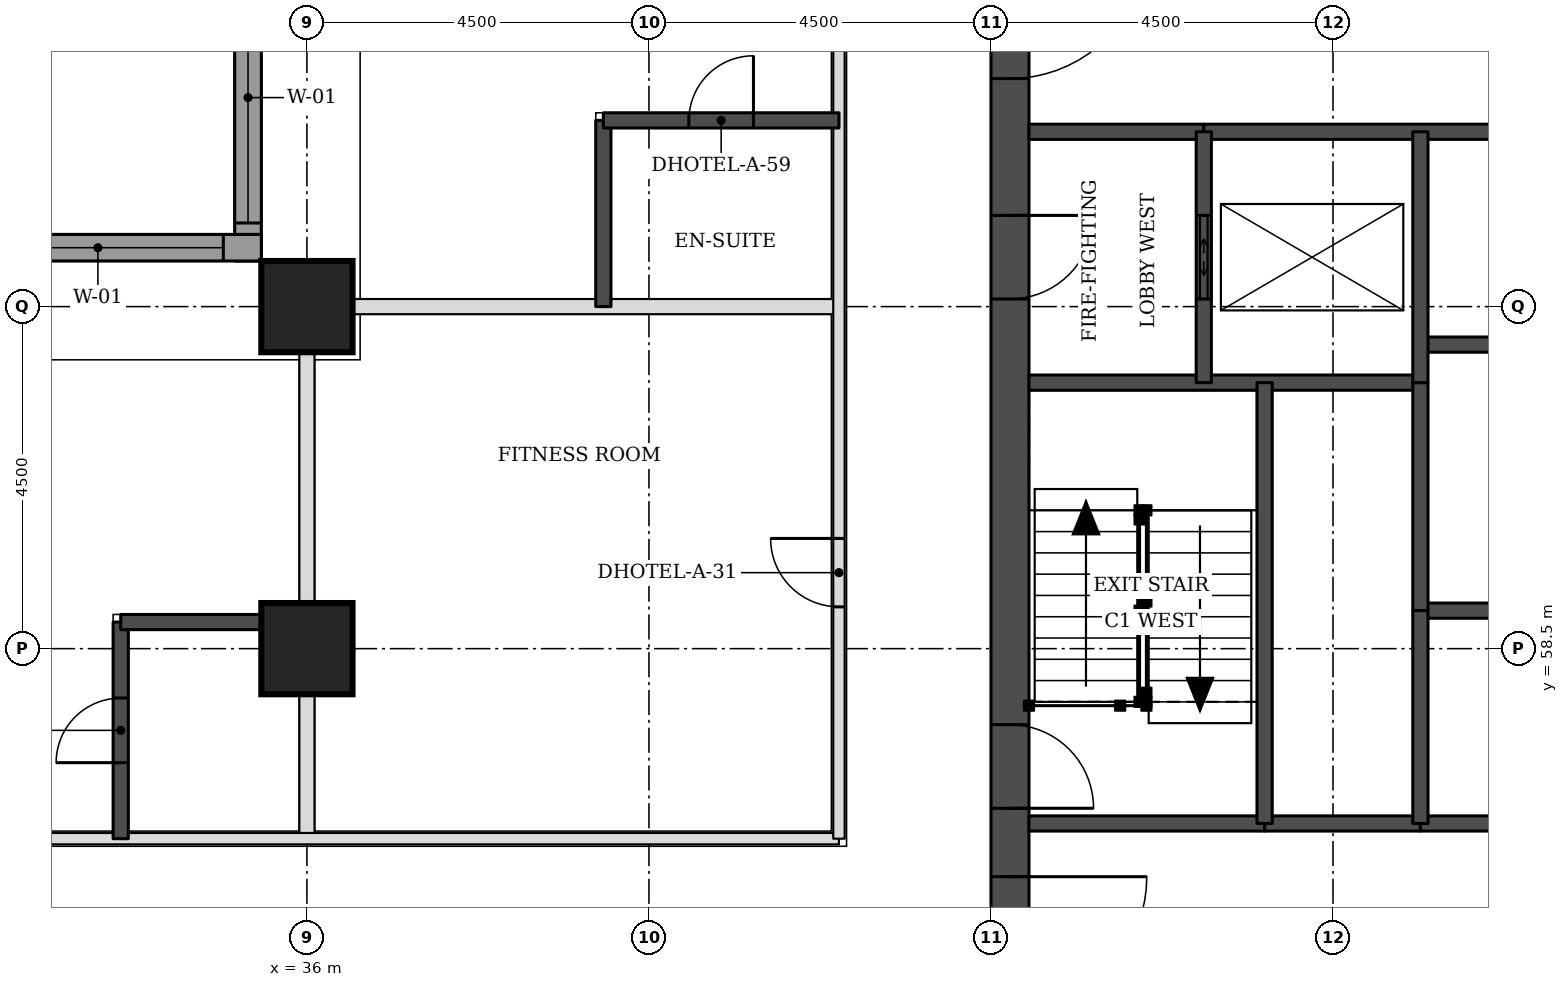
"""IFC4 building model, lengths in metres.
Left out: names, types, materials, properties, quantities, classifications, styles, units other than length and angle.
Written with IfcOpenShell. Run it as: python <this file> out.ifc"""

import sys

from ifc_helpers import new_model, si_unit, direction, frame, frame_2d, origin, origin_2d, place, context, subcontext, project, spatial, rectangle, extrude, element, fill, save


model = new_model("IFC4")
c1 = context("Model", 3, precision=1e-05, world=origin(), true_north=direction((0.0, 1.0)))
c2 = subcontext(c1, "Body", "Model", "MODEL_VIEW")
j1 = project(units=[si_unit("LENGTHUNIT", "METRE"), si_unit("PLANEANGLEUNIT", "RADIAN")], contexts=[c1])
p1 = place(None, origin())
s1 = spatial("IfcSite", under=j1, at=p1, CompositionType="ELEMENT")
p2 = place(p1, origin())
s2 = spatial("IfcBuilding", under=s1, at=p2, CompositionType="ELEMENT")
p3 = place(p2, frame((0.0, 0.0, 49.5)))
s3 = spatial("IfcBuildingStorey", under=s2, at=p3, CompositionType="ELEMENT", Elevation=49.5)
for number, where, z_axis, x_axis in (
    (1, (36.0, 58.5, 0.0), (0.0, 0.0, 1.0), (1.0, 0.0, 0.0)),
    (2, (36.0, 63.0, 0.0), (0.0, 0.0, 1.0), (1.0, 0.0, 0.0)),
):
    element("IfcColumn", number, at=place(p3, frame(where, z_axis=z_axis, x_axis=x_axis)), inside=s3, PredefinedType="COLUMN", context=c2, shape_type="SweptSolid", body=[
        extrude(rectangle(XDim=1.2, YDim=1.2, at=origin_2d()), origin(), (0.0, 0.0, 1.0), 3.3),
    ])
p4 = place(p3, frame((45.25, 49.5, 0.0), z_axis=(0.0, 0.0, 1.0), x_axis=(0.0, 1.0, 0.0)))
e3 = element("IfcWall", 3, at=p4, inside=s3, PredefinedType="SHEAR", context=c2, shape_type="SweptSolid", body=[
    extrude(rectangle(XDim=22.5, YDim=0.5, at=frame_2d((11.25, 0.0))), origin(), (0.0, 0.0, 1.0), 3.3),
])
p5 = place(p4, frame((4.2, 0.0, 0.0)))
e4 = element("IfcOpeningElement", 4, at=p5, cuts=e3, PredefinedType="OPENING", context=c2, shape_type="SweptSolid", body=[
    extrude(rectangle(XDim=1.8, YDim=2.1, at=frame_2d((0.9, 1.05))), frame((0.0, 0.26, 0.0), z_axis=(0.0, -1.0, 0.0), x_axis=(1.0, 0.0, 0.0)), (0.0, 0.0, 1.0), 0.52),
])
p6 = place(p4, frame((6.9, 0.0, 0.0)))
e5 = element("IfcOpeningElement", 5, at=p6, cuts=e3, PredefinedType="OPENING", context=c2, shape_type="SweptSolid", body=[
    extrude(rectangle(XDim=1.1, YDim=2.1, at=frame_2d((0.55, 1.05))), frame((0.0, 0.26, 0.0), z_axis=(0.0, -1.0, 0.0), x_axis=(1.0, 0.0, 0.0)), (0.0, 0.0, 1.0), 0.52),
])
p7 = place(p4, frame((13.6, 0.0, 0.0)))
e6 = element("IfcOpeningElement", 6, at=p7, cuts=e3, PredefinedType="OPENING", context=c2, shape_type="SweptSolid", body=[
    extrude(rectangle(XDim=1.1, YDim=2.1, at=frame_2d((0.55, 1.05))), frame((0.0, 0.26, 0.0), z_axis=(0.0, -1.0, 0.0), x_axis=(1.0, 0.0, 0.0)), (0.0, 0.0, 1.0), 0.52),
])
p8 = place(p4, frame((16.5, 0.0, 0.0)))
e7 = element("IfcOpeningElement", 7, at=p8, cuts=e3, PredefinedType="OPENING", context=c2, shape_type="SweptSolid", body=[
    extrude(rectangle(XDim=1.8, YDim=2.1, at=frame_2d((0.9, 1.05))), frame((0.0, 0.26, 0.0), z_axis=(0.0, -1.0, 0.0), x_axis=(1.0, 0.0, 0.0)), (0.0, 0.0, 1.0), 0.52),
])
p9 = place(p3, frame((35.225, 76.894, 0.0), z_axis=(0.0, 0.0, 1.0), x_axis=(0.0, -1.0, 0.0)))
e8 = element("IfcWall", 8, at=p9, inside=s3, PredefinedType="STANDARD", context=c2, shape_type="SweptSolid", body=[
    extrude(rectangle(XDim=13.293, YDim=0.35, at=frame_2d((6.647, 0.0))), origin(), (0.0, 0.0, 1.0), 3.055),
])
p10 = place(p9, frame((9.493, 0.0, 0.8)))
e9 = element("IfcOpeningElement", 9, at=p10, cuts=e8, PredefinedType="OPENING", context=c2, shape_type="SweptSolid", body=[
    extrude(rectangle(XDim=3.3, YDim=1.5, at=frame_2d((1.65, 0.75))), frame((0.0, 0.185, 0.0), z_axis=(0.0, -1.0, 0.0), x_axis=(1.0, 0.0, 0.0)), (0.0, 0.0, 1.0), 0.37),
])
p11 = place(p3, frame((35.4, 63.775, 0.0), z_axis=(0.0, 0.0, 1.0), x_axis=(-1.0, 0.0, 0.0)))
e10 = element("IfcWall", 10, at=p11, inside=s3, PredefinedType="STANDARD", context=c2, shape_type="SweptSolid", body=[
    extrude(rectangle(XDim=17.793, YDim=0.35, at=frame_2d((8.897, 0.0))), origin(), (0.0, 0.0, 1.0), 3.055),
])
p12 = place(p11, frame((0.5, 0.0, 0.8)))
e11 = element("IfcOpeningElement", 11, at=p12, cuts=e10, PredefinedType="OPENING", context=c2, shape_type="SweptSolid", body=[
    extrude(rectangle(XDim=3.3, YDim=1.5, at=frame_2d((1.65, 0.75))), frame((0.0, 0.185, 0.0), z_axis=(0.0, -1.0, 0.0), x_axis=(1.0, 0.0, 0.0)), (0.0, 0.0, 1.0), 0.37),
])
p13 = place(p11, frame((9.0, 0.0, 0.8)))
e12 = element("IfcOpeningElement", 12, at=p13, cuts=e10, PredefinedType="OPENING", context=c2, shape_type="SweptSolid", body=[
    extrude(rectangle(XDim=3.3, YDim=1.5, at=frame_2d((1.65, 0.75))), frame((0.0, 0.185, 0.0), z_axis=(0.0, -1.0, 0.0), x_axis=(1.0, 0.0, 0.0)), (0.0, 0.0, 1.0), 0.37),
])
p14 = place(p3, frame((36.0, 56.0, 0.0), z_axis=(0.0, 0.0, 1.0), x_axis=(0.0, 1.0, 0.0)))
e13 = element("IfcWall", 13, at=p14, inside=s3, PredefinedType="PARTITIONING", context=c2, shape_type="SweptSolid", body=[
    extrude(rectangle(XDim=6.4, YDim=0.2, at=frame_2d((3.2, 0.0))), origin(), (0.0, 0.0, 1.0), 2.33),
])
p15 = place(p3, frame((36.6, 63.0, 0.0), z_axis=(0.0, 0.0, 1.0), x_axis=(1.0, 0.0, 0.0)))
e14 = element("IfcWall", 14, at=p15, inside=s3, PredefinedType="PARTITIONING", context=c2, shape_type="SweptSolid", body=[
    extrude(rectangle(XDim=6.4, YDim=0.2, at=frame_2d((3.2, 0.0))), origin(), (0.0, 0.0, 1.0), 3.08),
])
p16 = place(p3, frame((27.0, 56.0, 0.0), z_axis=(0.0, 0.0, 1.0), x_axis=(1.0, 0.0, 0.0)))
e15 = element("IfcWall", 15, at=p16, inside=s3, PredefinedType="PARTITIONING", context=c2, shape_type="SweptSolid", body=[
    extrude(rectangle(XDim=16.0, YDim=0.15, at=frame_2d((8.0, 0.0))), origin(), (0.0, 0.0, 1.0), 3.08),
])
p17 = place(p16, frame((2.775, 0.0, 0.0)))
e16 = element("IfcOpeningElement", 16, at=p17, cuts=e15, PredefinedType="OPENING", context=c2, shape_type="SweptSolid", body=[
    extrude(rectangle(XDim=1.0, YDim=2.1, at=frame_2d((0.5, 1.05))), frame((0.0, 0.085, 0.0), z_axis=(0.0, -1.0, 0.0), x_axis=(1.0, 0.0, 0.0)), (0.0, 0.0, 1.0), 0.17),
])
p18 = place(p3, frame((43.0, 56.0, 0.0), z_axis=(0.0, 0.0, 1.0), x_axis=(0.0, 1.0, 0.0)))
e17 = element("IfcWall", 17, at=p18, inside=s3, PredefinedType="PARTITIONING", context=c2, shape_type="SweptSolid", body=[
    extrude(rectangle(XDim=18.0, YDim=0.15, at=frame_2d((9.0, 0.0))), origin(), (0.0, 0.0, 1.0), 3.08),
])
p19 = place(p18, frame((12.225, 0.0, 0.0)))
e18 = element("IfcOpeningElement", 18, at=p19, cuts=e17, PredefinedType="OPENING", context=c2, shape_type="SweptSolid", body=[
    extrude(rectangle(XDim=1.0, YDim=2.1, at=frame_2d((0.5, 1.05))), frame((0.0, 0.085, 0.0), z_axis=(0.0, -1.0, 0.0), x_axis=(1.0, 0.0, 0.0)), (0.0, 0.0, 1.0), 0.17),
])
p20 = place(p18, frame((16.553, 0.0, 0.0)))
e19 = element("IfcOpeningElement", 19, at=p20, cuts=e17, PredefinedType="OPENING", context=c2, shape_type="SweptSolid", body=[
    extrude(rectangle(XDim=1.0, YDim=2.1, at=frame_2d((0.5, 1.05))), frame((0.0, 0.085, 0.0), z_axis=(0.0, -1.0, 0.0), x_axis=(1.0, 0.0, 0.0)), (0.0, 0.0, 1.0), 0.17),
])
p21 = place(p18, frame((3.05, 0.0, 0.0)))
e20 = element("IfcOpeningElement", 20, at=p21, cuts=e17, PredefinedType="OPENING", context=c2, shape_type="SweptSolid", body=[
    extrude(rectangle(XDim=0.9, YDim=2.1, at=frame_2d((0.45, 1.05))), frame((0.0, 0.085, 0.0), z_axis=(0.0, -1.0, 0.0), x_axis=(1.0, 0.0, 0.0)), (0.0, 0.0, 1.0), 0.17),
])
p22 = place(p3, frame((33.55, 56.0, 0.0), z_axis=(0.0, 0.0, 1.0), x_axis=(0.0, 1.0, 0.0)))
e21 = element("IfcWall", 21, at=p22, inside=s3, PredefinedType="SOLIDWALL", context=c2, shape_type="SweptSolid", body=[
    extrude(rectangle(XDim=2.85, YDim=0.2, at=frame_2d((1.425, 0.0))), origin(), (0.0, 0.0, 1.0), 3.08),
])
p23 = place(p22, frame((1.0, 0.0, 0.0)))
e22 = element("IfcOpeningElement", 22, at=p23, cuts=e21, PredefinedType="OPENING", context=c2, shape_type="SweptSolid", body=[
    extrude(rectangle(XDim=0.85, YDim=2.1, at=frame_2d((0.425, 1.05))), frame((0.0, 0.11, 0.0), z_axis=(0.0, -1.0, 0.0), x_axis=(1.0, 0.0, 0.0)), (0.0, 0.0, 1.0), 0.22),
])
for number, where, z_axis, x_axis in (
    (23, (33.55, 58.85, 0.0), (0.0, 0.0, 1.0), (1.0, 0.0, 0.0)),
    (24, (39.9, 63.0, 0.0), (0.0, 0.0, 1.0), (0.0, 1.0, 0.0)),
):
    element("IfcWall", number, at=place(p3, frame(where, z_axis=z_axis, x_axis=x_axis)), inside=s3, PredefinedType="SOLIDWALL", context=c2, shape_type="SweptSolid", body=[
        extrude(rectangle(XDim=2.45, YDim=0.2, at=frame_2d((1.225, 0.0))), origin(), (0.0, 0.0, 1.0), 3.08),
    ])
p24 = place(p3, frame((39.9, 65.45, 0.0), z_axis=(0.0, 0.0, 1.0), x_axis=(1.0, 0.0, 0.0)))
e25 = element("IfcWall", 25, at=p24, inside=s3, PredefinedType="SOLIDWALL", context=c2, shape_type="SweptSolid", body=[
    extrude(rectangle(XDim=3.1, YDim=0.2, at=frame_2d((1.55, 0.0))), origin(), (0.0, 0.0, 1.0), 3.08),
])
p25 = place(p24, frame((1.125, 0.0, 0.0)))
e26 = element("IfcOpeningElement", 26, at=p25, cuts=e25, PredefinedType="OPENING", context=c2, shape_type="SweptSolid", body=[
    extrude(rectangle(XDim=0.85, YDim=2.1, at=frame_2d((0.425, 1.05))), frame((0.0, 0.11, 0.0), z_axis=(0.0, -1.0, 0.0), x_axis=(1.0, 0.0, 0.0)), (0.0, 0.0, 1.0), 0.22),
])
p26 = place(p3, frame((48.6, 56.2, 0.0), z_axis=(0.0, 0.0, 1.0), x_axis=(1.0, 0.0, 0.0)))
e27 = element("IfcWall", 27, at=p26, inside=s3, PredefinedType="SOLIDWALL", context=c2, shape_type="SweptSolid", body=[
    extrude(rectangle(XDim=2.05, YDim=0.2, at=frame_2d((1.025, 0.0))), origin(), (0.0, 0.0, 1.0), 3.08),
])
p27 = place(p3, frame((45.5, 56.2, 0.0), z_axis=(0.0, 0.0, 1.0), x_axis=(1.0, 0.0, 0.0)))
e28 = element("IfcWall", 28, at=p27, inside=s3, PredefinedType="SOLIDWALL", context=c2, shape_type="SweptSolid", body=[
    extrude(rectangle(XDim=3.1, YDim=0.2, at=frame_2d((1.55, 0.0))), origin(), (0.0, 0.0, 1.0), 3.08),
])
p28 = place(p3, frame((50.65, 56.2, 0.0), z_axis=(0.0, 0.0, 1.0), x_axis=(1.0, 0.0, 0.0)))
e29 = element("IfcWall", 29, at=p28, inside=s3, PredefinedType="SOLIDWALL", context=c2, shape_type="SweptSolid", body=[
    extrude(rectangle(XDim=11.2, YDim=0.2, at=frame_2d((5.6, 0.0))), origin(), (0.0, 0.0, 1.0), 3.08),
])
p29 = place(p3, frame((50.65, 59.0, 0.0), z_axis=(0.0, 0.0, 1.0), x_axis=(1.0, 0.0, 0.0)))
e30 = element("IfcWall", 30, at=p29, inside=s3, PredefinedType="SOLIDWALL", context=c2, shape_type="SweptSolid", body=[
    extrude(rectangle(XDim=11.2, YDim=0.2, at=frame_2d((5.6, 0.0))), origin(), (0.0, 0.0, 1.0), 3.3),
])
p30 = place(p3, frame((45.5, 62.0, 0.0), z_axis=(0.0, 0.0, 1.0), x_axis=(1.0, 0.0, 0.0)))
e31 = element("IfcWall", 31, at=p30, inside=s3, PredefinedType="SOLIDWALL", context=c2, shape_type="SweptSolid", body=[
    extrude(rectangle(XDim=5.15, YDim=0.2, at=frame_2d((2.575, 0.0))), origin(), (0.0, 0.0, 1.0), 3.08),
])
p31 = place(p3, frame((50.65, 62.5, 0.0), z_axis=(0.0, 0.0, 1.0), x_axis=(1.0, 0.0, 0.0)))
e32 = element("IfcWall", 32, at=p31, inside=s3, PredefinedType="SOLIDWALL", context=c2, shape_type="SweptSolid", body=[
    extrude(rectangle(XDim=11.2, YDim=0.2, at=frame_2d((5.6, 0.0))), origin(), (0.0, 0.0, 1.0), 3.3),
])
p32 = place(p3, frame((45.5, 65.3, 0.0), z_axis=(0.0, 0.0, 1.0), x_axis=(1.0, 0.0, 0.0)))
e33 = element("IfcWall", 33, at=p32, inside=s3, PredefinedType="SOLIDWALL", context=c2, shape_type="SweptSolid", body=[
    extrude(rectangle(XDim=2.3, YDim=0.2, at=frame_2d((1.15, 0.0))), origin(), (0.0, 0.0, 1.0), 3.08),
])
p33 = place(p3, frame((47.8, 65.3, 0.0), z_axis=(0.0, 0.0, 1.0), x_axis=(1.0, 0.0, 0.0)))
e34 = element("IfcWall", 34, at=p33, inside=s3, PredefinedType="SOLIDWALL", context=c2, shape_type="SweptSolid", body=[
    extrude(rectangle(XDim=16.9, YDim=0.2, at=frame_2d((8.45, 0.0))), origin(), (0.0, 0.0, 1.0), 3.08),
])
p34 = place(p3, frame((47.8, 62.0, 0.0), z_axis=(0.0, 0.0, 1.0), x_axis=(0.0, 1.0, 0.0)))
e35 = element("IfcWall", 35, at=p34, inside=s3, PredefinedType="SOLIDWALL", context=c2, shape_type="SweptSolid", body=[
    extrude(rectangle(XDim=3.3, YDim=0.2, at=frame_2d((1.65, 0.0))), origin(), (0.0, 0.0, 1.0), 3.08),
])
p35 = place(p34, frame((1.1, 0.0, 0.0)))
e36 = element("IfcOpeningElement", 36, at=p35, cuts=e35, PredefinedType="OPENING", context=c2, shape_type="SweptSolid", body=[
    extrude(rectangle(XDim=1.1, YDim=2.1, at=frame_2d((0.55, 1.05))), frame((0.0, 0.11, 0.0), z_axis=(0.0, -1.0, 0.0), x_axis=(1.0, 0.0, 0.0)), (0.0, 0.0, 1.0), 0.22),
])
p36 = place(p3, frame((48.6, 56.2, 0.0), z_axis=(0.0, 0.0, 1.0), x_axis=(0.0, 1.0, 0.0)))
e37 = element("IfcWall", 37, at=p36, inside=s3, PredefinedType="SOLIDWALL", context=c2, shape_type="SweptSolid", body=[
    extrude(rectangle(XDim=5.8, YDim=0.2, at=frame_2d((2.9, 0.0))), origin(), (0.0, 0.0, 1.0), 3.08),
])
p37 = place(p3, frame((50.65, 59.0, 0.0), z_axis=(0.0, 0.0, 1.0), x_axis=(0.0, 1.0, 0.0)))
e38 = element("IfcWall", 38, at=p37, inside=s3, PredefinedType="SOLIDWALL", context=c2, shape_type="SweptSolid", body=[
    extrude(rectangle(XDim=3.0, YDim=0.2, at=frame_2d((1.5, 0.0))), origin(), (0.0, 0.0, 1.0), 3.3),
])
p38 = place(p3, frame((50.65, 56.2, 0.0), z_axis=(0.0, 0.0, 1.0), x_axis=(0.0, 1.0, 0.0)))
e39 = element("IfcWall", 39, at=p38, inside=s3, PredefinedType="SOLIDWALL", context=c2, shape_type="SweptSolid", body=[
    extrude(rectangle(XDim=2.8, YDim=0.2, at=frame_2d((1.4, 0.0))), origin(), (0.0, 0.0, 1.0), 3.08),
])
p39 = place(p3, frame((50.65, 62.0, 0.0), z_axis=(0.0, 0.0, 1.0), x_axis=(0.0, 1.0, 0.0)))
e40 = element("IfcWall", 40, at=p39, inside=s3, PredefinedType="SOLIDWALL", context=c2, shape_type="SweptSolid", body=[
    extrude(rectangle(XDim=3.3, YDim=0.2, at=frame_2d((1.65, 0.0))), origin(), (0.0, 0.0, 1.0), 3.08),
])
p40 = place(p10, origin())
e41 = element("IfcWindow", 41, at=p40, inside=s3, PartitioningType="SINGLE_PANEL", PredefinedType="WINDOW", context=c2, shape_type="SweptSolid", body=[
    extrude(rectangle(XDim=3.3, YDim=1.5, at=frame_2d((1.65, 0.75))), frame((0.0, 0.085, 0.0), z_axis=(0.0, -1.0, 0.0), x_axis=(1.0, 0.0, 0.0)), (0.0, 0.0, 1.0), 0.06),
])
fill(e9, e41)
p41 = place(p12, origin())
e42 = element("IfcWindow", 42, at=p41, inside=s3, PartitioningType="SINGLE_PANEL", PredefinedType="WINDOW", context=c2, shape_type="SweptSolid", body=[
    extrude(rectangle(XDim=3.3, YDim=1.5, at=frame_2d((1.65, 0.75))), frame((0.0, 0.085, 0.0), z_axis=(0.0, -1.0, 0.0), x_axis=(1.0, 0.0, 0.0)), (0.0, 0.0, 1.0), 0.06),
])
fill(e11, e42)
p42 = place(p23, origin())
e43 = element("IfcDoor", 43, at=p42, inside=s3, OperationType="SINGLE_SWING_LEFT", PredefinedType="DOOR", context=c2, shape_type="SweptSolid", body=[
    extrude(rectangle(XDim=0.85, YDim=2.1, at=frame_2d((0.425, 1.05))), frame((0.0, 0.025, 0.0), z_axis=(0.0, -1.0, 0.0), x_axis=(1.0, 0.0, 0.0)), (0.0, 0.0, 1.0), 0.05),
])
fill(e22, e43)
p43 = place(p25, origin())
e44 = element("IfcDoor", 44, at=p43, inside=s3, OperationType="SINGLE_SWING_RIGHT", PredefinedType="DOOR", context=c2, shape_type="SweptSolid", body=[
    extrude(rectangle(XDim=0.85, YDim=2.1, at=frame_2d((0.425, 1.05))), frame((0.0, 0.025, 0.0), z_axis=(0.0, -1.0, 0.0), x_axis=(1.0, 0.0, 0.0)), (0.0, 0.0, 1.0), 0.05),
])
fill(e26, e44)
p44 = place(p21, origin())
e45 = element("IfcDoor", 45, at=p44, inside=s3, OperationType="SINGLE_SWING_RIGHT", PredefinedType="DOOR", context=c2, shape_type="SweptSolid", body=[
    extrude(rectangle(XDim=0.9, YDim=2.1, at=frame_2d((0.45, 1.05))), frame((0.0, 0.025, 0.0), z_axis=(0.0, -1.0, 0.0), x_axis=(1.0, 0.0, 0.0)), (0.0, 0.0, 1.0), 0.05),
])
fill(e20, e45)
p45 = place(p35, origin())
e46 = element("IfcDoor", 46, at=p45, inside=s3, OperationType="DOUBLE_DOOR_SLIDING", PredefinedType="DOOR", context=c2, shape_type="SweptSolid", body=[
    extrude(rectangle(XDim=1.1, YDim=2.1, at=frame_2d((0.55, 1.05))), frame((0.0, 0.025, 0.0), z_axis=(0.0, -1.0, 0.0), x_axis=(1.0, 0.0, 0.0)), (0.0, 0.0, 1.0), 0.05),
])
fill(e36, e46)
p46 = place(p5, frame((1.8, 0.0, 0.0), z_axis=(0.0, 0.0, 1.0), x_axis=(-1.0, 0.0, 0.0)))
e47 = element("IfcDoor", 47, at=p46, inside=s3, OperationType="SINGLE_SWING_LEFT", PredefinedType="DOOR", context=c2, shape_type="SweptSolid", body=[
    extrude(rectangle(XDim=1.8, YDim=2.1, at=frame_2d((0.9, 1.05))), frame((0.0, 0.025, 0.0), z_axis=(0.0, -1.0, 0.0), x_axis=(1.0, 0.0, 0.0)), (0.0, 0.0, 1.0), 0.05),
])
fill(e4, e47)
p47 = place(p6, frame((1.1, 0.0, 0.0), z_axis=(0.0, 0.0, 1.0), x_axis=(-1.0, 0.0, 0.0)))
e48 = element("IfcDoor", 48, at=p47, inside=s3, OperationType="SINGLE_SWING_RIGHT", PredefinedType="DOOR", context=c2, shape_type="SweptSolid", body=[
    extrude(rectangle(XDim=1.1, YDim=2.1, at=frame_2d((0.55, 1.05))), frame((0.0, 0.025, 0.0), z_axis=(0.0, -1.0, 0.0), x_axis=(1.0, 0.0, 0.0)), (0.0, 0.0, 1.0), 0.05),
])
fill(e5, e48)
p48 = place(p7, frame((1.1, 0.0, 0.0), z_axis=(0.0, 0.0, 1.0), x_axis=(-1.0, 0.0, 0.0)))
e49 = element("IfcDoor", 49, at=p48, inside=s3, OperationType="SINGLE_SWING_LEFT", PredefinedType="DOOR", context=c2, shape_type="SweptSolid", body=[
    extrude(rectangle(XDim=1.1, YDim=2.1, at=frame_2d((0.55, 1.05))), frame((0.0, 0.025, 0.0), z_axis=(0.0, -1.0, 0.0), x_axis=(1.0, 0.0, 0.0)), (0.0, 0.0, 1.0), 0.05),
])
fill(e6, e49)
p49 = place(p8, frame((1.8, 0.0, 0.0), z_axis=(0.0, 0.0, 1.0), x_axis=(-1.0, 0.0, 0.0)))
e50 = element("IfcDoor", 50, at=p49, inside=s3, OperationType="SINGLE_SWING_LEFT", PredefinedType="DOOR", context=c2, shape_type="SweptSolid", body=[
    extrude(rectangle(XDim=1.8, YDim=2.1, at=frame_2d((0.9, 1.05))), frame((0.0, 0.025, 0.0), z_axis=(0.0, -1.0, 0.0), x_axis=(1.0, 0.0, 0.0)), (0.0, 0.0, 1.0), 0.05),
])
fill(e7, e50)
save(model, sys.argv[1])
